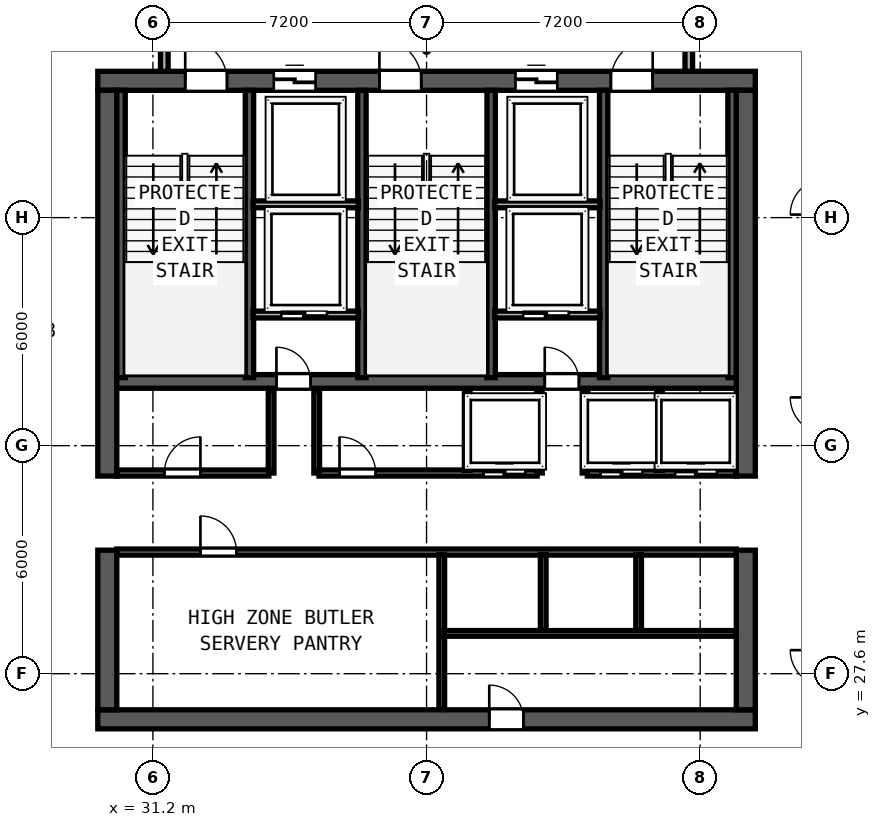
"""IFC4 building model, lengths in metres.
Left out: names, types, materials, properties, quantities, classifications, styles, units other than length and angle.
Written with IfcOpenShell. Run it as: python <this file> out.ifc"""

import sys

from ifc_helpers import new_model, si_unit, direction, frame, frame_2d, origin, place, context, subcontext, project, spatial, rectangle, extrude, element, fill, save


model = new_model("IFC4")
c1 = context("Model", 3, precision=1e-05, world=origin(), true_north=direction((0.0, 1.0)))
c2 = subcontext(c1, "Body", "Model", "MODEL_VIEW")
j1 = project(units=[si_unit("LENGTHUNIT", "METRE"), si_unit("PLANEANGLEUNIT", "RADIAN")], contexts=[c1])
p1 = place(None, origin())
s1 = spatial("IfcSite", under=j1, at=p1, CompositionType="ELEMENT")
p2 = place(p1, origin())
s2 = spatial("IfcBuilding", under=s1, at=p2, CompositionType="ELEMENT")
p3 = place(p2, frame((0.0, 0.0, 269.85)))
s3 = spatial("IfcBuildingStorey", under=s2, at=p3, CompositionType="ELEMENT", Elevation=269.85)
p4 = place(p3, frame((29.75, 26.4, 0.0), z_axis=(0.0, 0.0, 1.0), x_axis=(1.0, 0.0, 0.0)))
e1 = element("IfcWall", 1, at=p4, inside=s3, PredefinedType="SHEAR", context=c2, shape_type="SweptSolid", body=[
    extrude(rectangle(XDim=17.3, YDim=0.5, at=frame_2d((8.65, 0.0))), origin(), (0.0, 0.0, 1.0), 3.67),
])
p5 = place(p4, frame((11.2, 0.0, 0.0), z_axis=(0.0, 0.0, 1.0), x_axis=(-1.0, 0.0, 0.0)))
e2 = element("IfcOpeningElement", 2, at=p5, cuts=e1, PredefinedType="OPENING", context=c2, shape_type="SweptSolid", body=[
    extrude(rectangle(XDim=0.9, YDim=2.1, at=frame_2d((0.45, 1.05))), frame((0.0, 0.26, 0.0), z_axis=(0.0, -1.0, 0.0), x_axis=(1.0, 0.0, 0.0)), (0.0, 0.0, 1.0), 0.52),
])
p6 = place(p3, frame((29.75, 43.2, 0.0), z_axis=(0.0, 0.0, 1.0), x_axis=(1.0, 0.0, 0.0)))
e3 = element("IfcWall", 3, at=p6, inside=s3, PredefinedType="SHEAR", context=c2, shape_type="SweptSolid", body=[
    extrude(rectangle(XDim=17.3, YDim=0.5, at=frame_2d((8.65, 0.0))), origin(), (0.0, 0.0, 1.0), 3.67),
])
p7 = place(p6, frame((2.3, 0.0, 0.0)))
e4 = element("IfcOpeningElement", 4, at=p7, cuts=e3, PredefinedType="OPENING", context=c2, shape_type="SweptSolid", body=[
    extrude(rectangle(XDim=1.1, YDim=2.15, at=frame_2d((0.55, 1.075))), frame((0.0, 0.26, 0.0), z_axis=(0.0, -1.0, 0.0), x_axis=(1.0, 0.0, 0.0)), (0.0, 0.0, 1.0), 0.52),
])
p8 = place(p6, frame((7.41, 0.0, 0.0)))
e5 = element("IfcOpeningElement", 5, at=p8, cuts=e3, PredefinedType="OPENING", context=c2, shape_type="SweptSolid", body=[
    extrude(rectangle(XDim=1.1, YDim=2.15, at=frame_2d((0.55, 1.075))), frame((0.0, 0.26, 0.0), z_axis=(0.0, -1.0, 0.0), x_axis=(1.0, 0.0, 0.0)), (0.0, 0.0, 1.0), 0.52),
])
p9 = place(p6, frame((13.5, 0.0, 0.0)))
e6 = element("IfcOpeningElement", 6, at=p9, cuts=e3, PredefinedType="OPENING", context=c2, shape_type="SweptSolid", body=[
    extrude(rectangle(XDim=1.1, YDim=2.15, at=frame_2d((0.55, 1.075))), frame((0.0, 0.26, 0.0), z_axis=(0.0, -1.0, 0.0), x_axis=(1.0, 0.0, 0.0)), (0.0, 0.0, 1.0), 0.52),
])
p10 = place(p6, frame((4.63, 0.0, 0.0)))
e7 = element("IfcOpeningElement", 7, at=p10, cuts=e3, PredefinedType="OPENING", context=c2, shape_type="SweptSolid", body=[
    extrude(rectangle(XDim=1.1, YDim=2.2, at=frame_2d((0.55, 1.1))), frame((0.0, 0.26, 0.0), z_axis=(0.0, -1.0, 0.0), x_axis=(1.0, 0.0, 0.0)), (0.0, 0.0, 1.0), 0.52),
])
p11 = place(p6, frame((10.99, 0.0, 0.0)))
e8 = element("IfcOpeningElement", 8, at=p11, cuts=e3, PredefinedType="OPENING", context=c2, shape_type="SweptSolid", body=[
    extrude(rectangle(XDim=1.1, YDim=2.2, at=frame_2d((0.55, 1.1))), frame((0.0, 0.26, 0.0), z_axis=(0.0, -1.0, 0.0), x_axis=(1.0, 0.0, 0.0)), (0.0, 0.0, 1.0), 0.52),
])
p12 = place(p3, frame((30.0, 26.65, 0.0), z_axis=(0.0, 0.0, 1.0), x_axis=(0.0, 1.0, 0.0)))
e9 = element("IfcWall", 9, at=p12, inside=s3, PredefinedType="SHEAR", context=c2, shape_type="SweptSolid", body=[
    extrude(rectangle(XDim=4.2, YDim=0.5, at=frame_2d((2.1, 0.0))), origin(), (0.0, 0.0, 1.0), 3.67),
])
p13 = place(p3, frame((30.0, 32.8, 0.0), z_axis=(0.0, 0.0, 1.0), x_axis=(0.0, 1.0, 0.0)))
e10 = element("IfcWall", 10, at=p13, inside=s3, PredefinedType="SHEAR", context=c2, shape_type="SweptSolid", body=[
    extrude(rectangle(XDim=10.15, YDim=0.5, at=frame_2d((5.075, 0.0))), origin(), (0.0, 0.0, 1.0), 3.67),
])
p14 = place(p3, frame((46.8, 26.65, 0.0), z_axis=(0.0, 0.0, 1.0), x_axis=(0.0, 1.0, 0.0)))
e11 = element("IfcWall", 11, at=p14, inside=s3, PredefinedType="SHEAR", context=c2, shape_type="SweptSolid", body=[
    extrude(rectangle(XDim=4.2, YDim=0.5, at=frame_2d((2.1, 0.0))), origin(), (0.0, 0.0, 1.0), 3.67),
])
p15 = place(p3, frame((46.8, 32.8, 0.0), z_axis=(0.0, 0.0, 1.0), x_axis=(0.0, 1.0, 0.0)))
e12 = element("IfcWall", 12, at=p15, inside=s3, PredefinedType="SHEAR", context=c2, shape_type="SweptSolid", body=[
    extrude(rectangle(XDim=10.15, YDim=0.5, at=frame_2d((5.075, 0.0))), origin(), (0.0, 0.0, 1.0), 3.67),
])
p16 = place(p3, frame((30.25, 35.29, 0.0), z_axis=(0.0, 0.0, 1.0), x_axis=(1.0, 0.0, 0.0)))
e13 = element("IfcWall", 13, at=p16, inside=s3, PredefinedType="SHEAR", context=c2, shape_type="SweptSolid", body=[
    extrude(rectangle(XDim=16.3, YDim=0.36, at=frame_2d((8.15, 0.0))), origin(), (0.0, 0.0, 1.0), 3.67),
])
p17 = place(p16, frame((5.1, 0.0, 0.0), z_axis=(0.0, 0.0, 1.0), x_axis=(-1.0, 0.0, 0.0)))
e14 = element("IfcOpeningElement", 14, at=p17, cuts=e13, PredefinedType="OPENING", context=c2, shape_type="SweptSolid", body=[
    extrude(rectangle(XDim=0.9, YDim=2.1, at=frame_2d((0.45, 1.05))), frame((0.0, 0.19, 0.0), z_axis=(0.0, -1.0, 0.0), x_axis=(1.0, 0.0, 0.0)), (0.0, 0.0, 1.0), 0.38),
])
p18 = place(p16, frame((12.16, 0.0, 0.0), z_axis=(0.0, 0.0, 1.0), x_axis=(-1.0, 0.0, 0.0)))
e15 = element("IfcOpeningElement", 15, at=p18, cuts=e13, PredefinedType="OPENING", context=c2, shape_type="SweptSolid", body=[
    extrude(rectangle(XDim=0.9, YDim=2.1, at=frame_2d((0.45, 1.05))), frame((0.0, 0.19, 0.0), z_axis=(0.0, -1.0, 0.0), x_axis=(1.0, 0.0, 0.0)), (0.0, 0.0, 1.0), 0.38),
])
for number, where, z_axis, x_axis in (
    (16, (30.362, 35.39, 0.0), (0.0, 0.0, 1.0), (0.0, 1.0, 0.0)),
    (17, (33.74, 35.39, 0.0), (0.0, 0.0, 1.0), (0.0, 1.0, 0.0)),
    (18, (36.7, 35.39, 0.0), (0.0, 0.0, 1.0), (0.0, 1.0, 0.0)),
    (19, (40.1, 35.39, 0.0), (0.0, 0.0, 1.0), (0.0, 1.0, 0.0)),
    (20, (43.06, 35.39, 0.0), (0.0, 0.0, 1.0), (0.0, 1.0, 0.0)),
    (21, (46.438, 35.39, 0.0), (0.0, 0.0, 1.0), (0.0, 1.0, 0.0)),
):
    element("IfcWall", number, at=place(p3, frame(where, z_axis=z_axis, x_axis=x_axis)), inside=s3, PredefinedType="SHEAR", context=c2, shape_type="SweptSolid", body=[
        extrude(rectangle(XDim=7.56, YDim=0.22, at=frame_2d((3.78, 0.0))), origin(), (0.0, 0.0, 1.0), 3.67),
    ])
p19 = place(p3, frame((31.5, 43.45, 0.0), z_axis=(0.0, 0.0, 1.0), x_axis=(0.0, 1.0, 0.0)))
e22 = element("IfcWall", 22, at=p19, inside=s3, PredefinedType="SOLIDWALL", context=c2, shape_type="SweptSolid", body=[
    extrude(rectangle(XDim=2.445, YDim=0.2, at=frame_2d((1.223, 0.0))), origin(), (0.0, 0.0, 1.0), 3.67),
])
p20 = place(p19, frame((1.8, 0.0, 0.0), z_axis=(0.0, 0.0, 1.0), x_axis=(-1.0, 0.0, 0.0)))
e23 = element("IfcOpeningElement", 23, at=p20, cuts=e22, PredefinedType="OPENING", context=c2, shape_type="SweptSolid", body=[
    extrude(rectangle(XDim=1.1, YDim=2.15, at=frame_2d((0.55, 1.075))), frame((0.0, 0.11, 0.0), z_axis=(0.0, -1.0, 0.0), x_axis=(1.0, 0.0, 0.0)), (0.0, 0.0, 1.0), 0.22),
])
p21 = place(p3, frame((45.3, 43.45, 0.0), z_axis=(0.0, 0.0, 1.0), x_axis=(0.0, 1.0, 0.0)))
e24 = element("IfcWall", 24, at=p21, inside=s3, PredefinedType="SOLIDWALL", context=c2, shape_type="SweptSolid", body=[
    extrude(rectangle(XDim=2.445, YDim=0.2, at=frame_2d((1.223, 0.0))), origin(), (0.0, 0.0, 1.0), 3.67),
])
p22 = place(p21, frame((0.7, 0.0, 0.0)))
e25 = element("IfcOpeningElement", 25, at=p22, cuts=e24, PredefinedType="OPENING", context=c2, shape_type="SweptSolid", body=[
    extrude(rectangle(XDim=1.1, YDim=2.15, at=frame_2d((0.55, 1.075))), frame((0.0, 0.11, 0.0), z_axis=(0.0, -1.0, 0.0), x_axis=(1.0, 0.0, 0.0)), (0.0, 0.0, 1.0), 0.22),
])
for number, where, z_axis, x_axis in (
    (26, (33.835, 39.95, 0.0), (0.0, 0.0, 1.0), (1.0, 0.0, 0.0)),
    (27, (40.195, 39.95, 0.0), (0.0, 0.0, 1.0), (1.0, 0.0, 0.0)),
):
    element("IfcWall", number, at=place(p3, frame(where, z_axis=z_axis, x_axis=x_axis)), inside=s3, PredefinedType="SOLIDWALL", context=c2, shape_type="SweptSolid", body=[
        extrude(rectangle(XDim=2.77, YDim=0.18, at=frame_2d((1.385, 0.0))), origin(), (0.0, 0.0, 1.0), 3.67),
    ])
p23 = place(p3, frame((33.835, 37.05, 0.0), z_axis=(0.0, 0.0, 1.0), x_axis=(1.0, 0.0, 0.0)))
e28 = element("IfcWall", 28, at=p23, inside=s3, PredefinedType="SOLIDWALL", context=c2, shape_type="SweptSolid", body=[
    extrude(rectangle(XDim=2.77, YDim=0.18, at=frame_2d((1.385, 0.0))), origin(), (0.0, 0.0, 1.0), 3.67),
])
p24 = place(p23, frame((1.945, 0.0, 0.0), z_axis=(0.0, 0.0, 1.0), x_axis=(-1.0, 0.0, 0.0)))
e29 = element("IfcOpeningElement", 29, at=p24, cuts=e28, PredefinedType="OPENING", context=c2, shape_type="SweptSolid", body=[
    extrude(rectangle(XDim=1.2, YDim=2.2, at=frame_2d((0.6, 1.1))), frame((0.0, 0.1, 0.0), z_axis=(0.0, -1.0, 0.0), x_axis=(1.0, 0.0, 0.0)), (0.0, 0.0, 1.0), 0.2),
])
for number, where, z_axis, x_axis in (
    (30, (34.31, 32.88, 0.0), (0.0, 0.0, 1.0), (0.0, 1.0, 0.0)),
    (31, (35.51, 32.88, 0.0), (0.0, 0.0, 1.0), (0.0, 1.0, 0.0)),
):
    element("IfcWall", number, at=place(p3, frame(where, z_axis=z_axis, x_axis=x_axis)), inside=s3, PredefinedType="SOLIDWALL", context=c2, shape_type="SweptSolid", body=[
        extrude(rectangle(XDim=2.17, YDim=0.15, at=frame_2d((1.085, 0.0))), origin(), (0.0, 0.0, 1.0), 3.67),
    ])
p25 = place(p3, frame((40.195, 37.05, 0.0), z_axis=(0.0, 0.0, 1.0), x_axis=(1.0, 0.0, 0.0)))
e32 = element("IfcWall", 32, at=p25, inside=s3, PredefinedType="SOLIDWALL", context=c2, shape_type="SweptSolid", body=[
    extrude(rectangle(XDim=2.77, YDim=0.18, at=frame_2d((1.385, 0.0))), origin(), (0.0, 0.0, 1.0), 3.67),
])
p26 = place(p25, frame((1.945, 0.0, 0.0), z_axis=(0.0, 0.0, 1.0), x_axis=(-1.0, 0.0, 0.0)))
e33 = element("IfcOpeningElement", 33, at=p26, cuts=e32, PredefinedType="OPENING", context=c2, shape_type="SweptSolid", body=[
    extrude(rectangle(XDim=1.2, YDim=2.2, at=frame_2d((0.6, 1.1))), frame((0.0, 0.1, 0.0), z_axis=(0.0, -1.0, 0.0), x_axis=(1.0, 0.0, 0.0)), (0.0, 0.0, 1.0), 0.2),
])
for number, where, z_axis, x_axis in (
    (34, (41.37, 32.88, 0.0), (0.0, 0.0, 1.0), (0.0, 1.0, 0.0)),
    (35, (42.57, 32.88, 0.0), (0.0, 0.0, 1.0), (0.0, 1.0, 0.0)),
):
    element("IfcWall", number, at=place(p3, frame(where, z_axis=z_axis, x_axis=x_axis)), inside=s3, PredefinedType="SOLIDWALL", context=c2, shape_type="SweptSolid", body=[
        extrude(rectangle(XDim=2.17, YDim=0.15, at=frame_2d((1.085, 0.0))), origin(), (0.0, 0.0, 1.0), 3.67),
    ])
p27 = place(p3, frame((30.25, 32.88, 0.0), z_axis=(0.0, 0.0, 1.0), x_axis=(1.0, 0.0, 0.0)))
e36 = element("IfcWall", 36, at=p27, inside=s3, PredefinedType="SOLIDWALL", context=c2, shape_type="SweptSolid", body=[
    extrude(rectangle(XDim=4.0, YDim=0.16, at=frame_2d((2.0, 0.0))), origin(), (0.0, 0.0, 1.0), 3.67),
])
p28 = place(p27, frame((2.2, 0.0, 0.0), z_axis=(0.0, 0.0, 1.0), x_axis=(-1.0, 0.0, 0.0)))
e37 = element("IfcOpeningElement", 37, at=p28, cuts=e36, PredefinedType="OPENING", context=c2, shape_type="SweptSolid", body=[
    extrude(rectangle(XDim=0.95, YDim=2.12, at=frame_2d((0.475, 1.06))), frame((0.0, 0.09, 0.0), z_axis=(0.0, -1.0, 0.0), x_axis=(1.0, 0.0, 0.0)), (0.0, 0.0, 1.0), 0.18),
])
p29 = place(p3, frame((35.57, 32.88, 0.0), z_axis=(0.0, 0.0, 1.0), x_axis=(1.0, 0.0, 0.0)))
e38 = element("IfcWall", 38, at=p29, inside=s3, PredefinedType="SOLIDWALL", context=c2, shape_type="SweptSolid", body=[
    extrude(rectangle(XDim=5.74, YDim=0.16, at=frame_2d((2.87, 0.0))), origin(), (0.0, 0.0, 1.0), 3.67),
])
p30 = place(p29, frame((1.49, 0.0, 0.0), z_axis=(0.0, 0.0, 1.0), x_axis=(-1.0, 0.0, 0.0)))
e39 = element("IfcOpeningElement", 39, at=p30, cuts=e38, PredefinedType="OPENING", context=c2, shape_type="SweptSolid", body=[
    extrude(rectangle(XDim=0.95, YDim=2.12, at=frame_2d((0.475, 1.06))), frame((0.0, 0.09, 0.0), z_axis=(0.0, -1.0, 0.0), x_axis=(1.0, 0.0, 0.0)), (0.0, 0.0, 1.0), 0.18),
])
p31 = place(p29, frame((5.43, 0.0, 0.0), z_axis=(0.0, 0.0, 1.0), x_axis=(-1.0, 0.0, 0.0)))
e40 = element("IfcOpeningElement", 40, at=p31, cuts=e38, PredefinedType="OPENING", context=c2, shape_type="SweptSolid", body=[
    extrude(rectangle(XDim=1.1, YDim=2.2, at=frame_2d((0.55, 1.1))), frame((0.0, 0.09, 0.0), z_axis=(0.0, -1.0, 0.0), x_axis=(1.0, 0.0, 0.0)), (0.0, 0.0, 1.0), 0.18),
])
p32 = place(p3, frame((42.63, 32.88, 0.0), z_axis=(0.0, 0.0, 1.0), x_axis=(1.0, 0.0, 0.0)))
e41 = element("IfcWall", 41, at=p32, inside=s3, PredefinedType="SOLIDWALL", context=c2, shape_type="SweptSolid", body=[
    extrude(rectangle(XDim=3.92, YDim=0.16, at=frame_2d((1.96, 0.0))), origin(), (0.0, 0.0, 1.0), 3.67),
])
p33 = place(p32, frame((1.45, 0.0, 0.0), z_axis=(0.0, 0.0, 1.0), x_axis=(-1.0, 0.0, 0.0)))
e42 = element("IfcOpeningElement", 42, at=p33, cuts=e41, PredefinedType="OPENING", context=c2, shape_type="SweptSolid", body=[
    extrude(rectangle(XDim=1.1, YDim=2.2, at=frame_2d((0.55, 1.1))), frame((0.0, 0.09, 0.0), z_axis=(0.0, -1.0, 0.0), x_axis=(1.0, 0.0, 0.0)), (0.0, 0.0, 1.0), 0.18),
])
p34 = place(p32, frame((3.41, 0.0, 0.0), z_axis=(0.0, 0.0, 1.0), x_axis=(-1.0, 0.0, 0.0)))
e43 = element("IfcOpeningElement", 43, at=p34, cuts=e41, PredefinedType="OPENING", context=c2, shape_type="SweptSolid", body=[
    extrude(rectangle(XDim=1.1, YDim=2.2, at=frame_2d((0.55, 1.1))), frame((0.0, 0.09, 0.0), z_axis=(0.0, -1.0, 0.0), x_axis=(1.0, 0.0, 0.0)), (0.0, 0.0, 1.0), 0.18),
])
for number, where, z_axis, x_axis in (
    (44, (39.47, 32.95, 0.0), (0.0, 0.0, 1.0), (0.0, 1.0, 0.0)),
    (45, (44.53, 32.95, 0.0), (0.0, 0.0, 1.0), (0.0, 1.0, 0.0)),
):
    element("IfcWall", number, at=place(p3, frame(where, z_axis=z_axis, x_axis=x_axis)), inside=s3, PredefinedType="SOLIDWALL", context=c2, shape_type="SweptSolid", body=[
        extrude(rectangle(XDim=2.05, YDim=0.15, at=frame_2d((1.025, 0.0))), origin(), (0.0, 0.0, 1.0), 3.67),
    ])
p35 = place(p3, frame((30.25, 30.8, 0.0), z_axis=(0.0, 0.0, 1.0), x_axis=(1.0, 0.0, 0.0)))
e46 = element("IfcWall", 46, at=p35, inside=s3, PredefinedType="SOLIDWALL", context=c2, shape_type="SweptSolid", body=[
    extrude(rectangle(XDim=16.3, YDim=0.16, at=frame_2d((8.15, 0.0))), origin(), (0.0, 0.0, 1.0), 3.67),
])
p36 = place(p35, frame((2.2, 0.0, 0.0)))
e47 = element("IfcOpeningElement", 47, at=p36, cuts=e46, PredefinedType="OPENING", context=c2, shape_type="SweptSolid", body=[
    extrude(rectangle(XDim=0.95, YDim=2.12, at=frame_2d((0.475, 1.06))), frame((0.0, 0.09, 0.0), z_axis=(0.0, -1.0, 0.0), x_axis=(1.0, 0.0, 0.0)), (0.0, 0.0, 1.0), 0.18),
])
p37 = place(p3, frame((38.8, 26.66, 0.0), z_axis=(0.0, 0.0, 1.0), x_axis=(0.0, 1.0, 0.0)))
e48 = element("IfcWall", 48, at=p37, inside=s3, PredefinedType="SOLIDWALL", context=c2, shape_type="SweptSolid", body=[
    extrude(rectangle(XDim=4.075, YDim=0.15, at=frame_2d((2.038, 0.0))), origin(), (0.0, 0.0, 1.0), 3.67),
])
p38 = place(p3, frame((38.86, 28.66, 0.0), z_axis=(0.0, 0.0, 1.0), x_axis=(1.0, 0.0, 0.0)))
e49 = element("IfcWall", 49, at=p38, inside=s3, PredefinedType="PARTITIONING", context=c2, shape_type="SweptSolid", body=[
    extrude(rectangle(XDim=7.69, YDim=0.15, at=frame_2d((3.845, 0.0))), origin(), (0.0, 0.0, 1.0), 3.67),
])
for number, where, z_axis, x_axis in (
    (50, (41.47, 28.75, 0.0), (0.0, 0.0, 1.0), (0.0, 1.0, 0.0)),
    (51, (43.98, 28.75, 0.0), (0.0, 0.0, 1.0), (0.0, 1.0, 0.0)),
):
    element("IfcWall", number, at=place(p3, frame(where, z_axis=z_axis, x_axis=x_axis)), inside=s3, PredefinedType="SOLIDWALL", context=c2, shape_type="SweptSolid", body=[
        extrude(rectangle(XDim=1.985, YDim=0.15, at=frame_2d((0.993, 0.0))), origin(), (0.0, 0.0, 1.0), 3.67),
    ])
p39 = place(p7, origin())
e52 = element("IfcDoor", 52, at=p39, inside=s3, OperationType="SINGLE_SWING_LEFT", PredefinedType="DOOR", context=c2, shape_type="SweptSolid", body=[
    extrude(rectangle(XDim=1.1, YDim=2.15, at=frame_2d((0.55, 1.075))), frame((0.0, 0.185, 0.0), z_axis=(0.0, -1.0, 0.0), x_axis=(1.0, 0.0, 0.0)), (0.0, 0.0, 1.0), 0.05),
])
fill(e4, e52)
p40 = place(p8, origin())
e53 = element("IfcDoor", 53, at=p40, inside=s3, OperationType="SINGLE_SWING_LEFT", PredefinedType="DOOR", context=c2, shape_type="SweptSolid", body=[
    extrude(rectangle(XDim=1.1, YDim=2.15, at=frame_2d((0.55, 1.075))), frame((0.0, 0.185, 0.0), z_axis=(0.0, -1.0, 0.0), x_axis=(1.0, 0.0, 0.0)), (0.0, 0.0, 1.0), 0.05),
])
fill(e5, e53)
p41 = place(p9, origin())
e54 = element("IfcDoor", 54, at=p41, inside=s3, OperationType="SINGLE_SWING_RIGHT", PredefinedType="DOOR", context=c2, shape_type="SweptSolid", body=[
    extrude(rectangle(XDim=1.1, YDim=2.15, at=frame_2d((0.55, 1.075))), frame((0.0, 0.185, 0.0), z_axis=(0.0, -1.0, 0.0), x_axis=(1.0, 0.0, 0.0)), (0.0, 0.0, 1.0), 0.05),
])
fill(e6, e54)
p42 = place(p10, origin())
e55 = element("IfcDoor", 55, at=p42, inside=s3, OperationType="SLIDING_TO_LEFT", PredefinedType="DOOR", context=c2, shape_type="SweptSolid", body=[
    extrude(rectangle(XDim=1.1, YDim=2.2, at=frame_2d((0.55, 1.1))), frame((0.0, 0.185, 0.0), z_axis=(0.0, -1.0, 0.0), x_axis=(1.0, 0.0, 0.0)), (0.0, 0.0, 1.0), 0.05),
])
fill(e7, e55)
p43 = place(p11, origin())
e56 = element("IfcDoor", 56, at=p43, inside=s3, OperationType="SLIDING_TO_LEFT", PredefinedType="DOOR", context=c2, shape_type="SweptSolid", body=[
    extrude(rectangle(XDim=1.1, YDim=2.2, at=frame_2d((0.55, 1.1))), frame((0.0, 0.185, 0.0), z_axis=(0.0, -1.0, 0.0), x_axis=(1.0, 0.0, 0.0)), (0.0, 0.0, 1.0), 0.05),
])
fill(e8, e56)
p44 = place(p24, origin())
e57 = element("IfcDoor", 57, at=p44, inside=s3, OperationType="SLIDING_TO_RIGHT", PredefinedType="DOOR", context=c2, shape_type="SweptSolid", body=[
    extrude(rectangle(XDim=1.2, YDim=2.2, at=frame_2d((0.6, 1.1))), frame((0.0, 0.025, 0.0), z_axis=(0.0, -1.0, 0.0), x_axis=(1.0, 0.0, 0.0)), (0.0, 0.0, 1.0), 0.05),
])
fill(e29, e57)
p45 = place(p17, origin())
e58 = element("IfcDoor", 58, at=p45, inside=s3, OperationType="SINGLE_SWING_RIGHT", PredefinedType="DOOR", context=c2, shape_type="SweptSolid", body=[
    extrude(rectangle(XDim=0.9, YDim=2.1, at=frame_2d((0.45, 1.05))), frame((0.0, 0.025, 0.0), z_axis=(0.0, -1.0, 0.0), x_axis=(1.0, 0.0, 0.0)), (0.0, 0.0, 1.0), 0.05),
])
fill(e14, e58)
p46 = place(p26, origin())
e59 = element("IfcDoor", 59, at=p46, inside=s3, OperationType="SLIDING_TO_RIGHT", PredefinedType="DOOR", context=c2, shape_type="SweptSolid", body=[
    extrude(rectangle(XDim=1.2, YDim=2.2, at=frame_2d((0.6, 1.1))), frame((0.0, 0.025, 0.0), z_axis=(0.0, -1.0, 0.0), x_axis=(1.0, 0.0, 0.0)), (0.0, 0.0, 1.0), 0.05),
])
fill(e33, e59)
p47 = place(p18, origin())
e60 = element("IfcDoor", 60, at=p47, inside=s3, OperationType="SINGLE_SWING_RIGHT", PredefinedType="DOOR", context=c2, shape_type="SweptSolid", body=[
    extrude(rectangle(XDim=0.9, YDim=2.1, at=frame_2d((0.45, 1.05))), frame((0.0, 0.025, 0.0), z_axis=(0.0, -1.0, 0.0), x_axis=(1.0, 0.0, 0.0)), (0.0, 0.0, 1.0), 0.05),
])
fill(e15, e60)
p48 = place(p28, origin())
e61 = element("IfcDoor", 61, at=p48, inside=s3, OperationType="SINGLE_SWING_LEFT", PredefinedType="DOOR", context=c2, shape_type="SweptSolid", body=[
    extrude(rectangle(XDim=0.95, YDim=2.12, at=frame_2d((0.475, 1.06))), frame((0.0, 0.025, 0.0), z_axis=(0.0, -1.0, 0.0), x_axis=(1.0, 0.0, 0.0)), (0.0, 0.0, 1.0), 0.05),
])
fill(e37, e61)
p49 = place(p30, origin())
e62 = element("IfcDoor", 62, at=p49, inside=s3, OperationType="SINGLE_SWING_RIGHT", PredefinedType="DOOR", context=c2, shape_type="SweptSolid", body=[
    extrude(rectangle(XDim=0.95, YDim=2.12, at=frame_2d((0.475, 1.06))), frame((0.0, 0.025, 0.0), z_axis=(0.0, -1.0, 0.0), x_axis=(1.0, 0.0, 0.0)), (0.0, 0.0, 1.0), 0.05),
])
fill(e39, e62)
p50 = place(p31, origin())
e63 = element("IfcDoor", 63, at=p50, inside=s3, OperationType="SLIDING_TO_RIGHT", PredefinedType="DOOR", context=c2, shape_type="SweptSolid", body=[
    extrude(rectangle(XDim=1.1, YDim=2.2, at=frame_2d((0.55, 1.1))), frame((0.0, 0.025, 0.0), z_axis=(0.0, -1.0, 0.0), x_axis=(1.0, 0.0, 0.0)), (0.0, 0.0, 1.0), 0.05),
])
fill(e40, e63)
p51 = place(p33, origin())
e64 = element("IfcDoor", 64, at=p51, inside=s3, OperationType="SLIDING_TO_RIGHT", PredefinedType="DOOR", context=c2, shape_type="SweptSolid", body=[
    extrude(rectangle(XDim=1.1, YDim=2.2, at=frame_2d((0.55, 1.1))), frame((0.0, 0.025, 0.0), z_axis=(0.0, -1.0, 0.0), x_axis=(1.0, 0.0, 0.0)), (0.0, 0.0, 1.0), 0.05),
])
fill(e42, e64)
p52 = place(p34, origin())
e65 = element("IfcDoor", 65, at=p52, inside=s3, OperationType="SLIDING_TO_RIGHT", PredefinedType="DOOR", context=c2, shape_type="SweptSolid", body=[
    extrude(rectangle(XDim=1.1, YDim=2.2, at=frame_2d((0.55, 1.1))), frame((0.0, 0.025, 0.0), z_axis=(0.0, -1.0, 0.0), x_axis=(1.0, 0.0, 0.0)), (0.0, 0.0, 1.0), 0.05),
])
fill(e43, e65)
p53 = place(p36, origin())
e66 = element("IfcDoor", 66, at=p53, inside=s3, OperationType="SINGLE_SWING_LEFT", PredefinedType="DOOR", context=c2, shape_type="SweptSolid", body=[
    extrude(rectangle(XDim=0.95, YDim=2.12, at=frame_2d((0.475, 1.06))), frame((0.0, 0.025, 0.0), z_axis=(0.0, -1.0, 0.0), x_axis=(1.0, 0.0, 0.0)), (0.0, 0.0, 1.0), 0.05),
])
fill(e47, e66)
p54 = place(p5, origin())
e67 = element("IfcDoor", 67, at=p54, inside=s3, OperationType="SINGLE_SWING_RIGHT", PredefinedType="DOOR", context=c2, shape_type="SweptSolid", body=[
    extrude(rectangle(XDim=0.9, YDim=2.1, at=frame_2d((0.45, 1.05))), frame((0.0, -0.195, 0.0), z_axis=(0.0, -1.0, 0.0), x_axis=(1.0, 0.0, 0.0)), (0.0, 0.0, 1.0), 0.05),
])
fill(e2, e67)
save(model, sys.argv[1])
